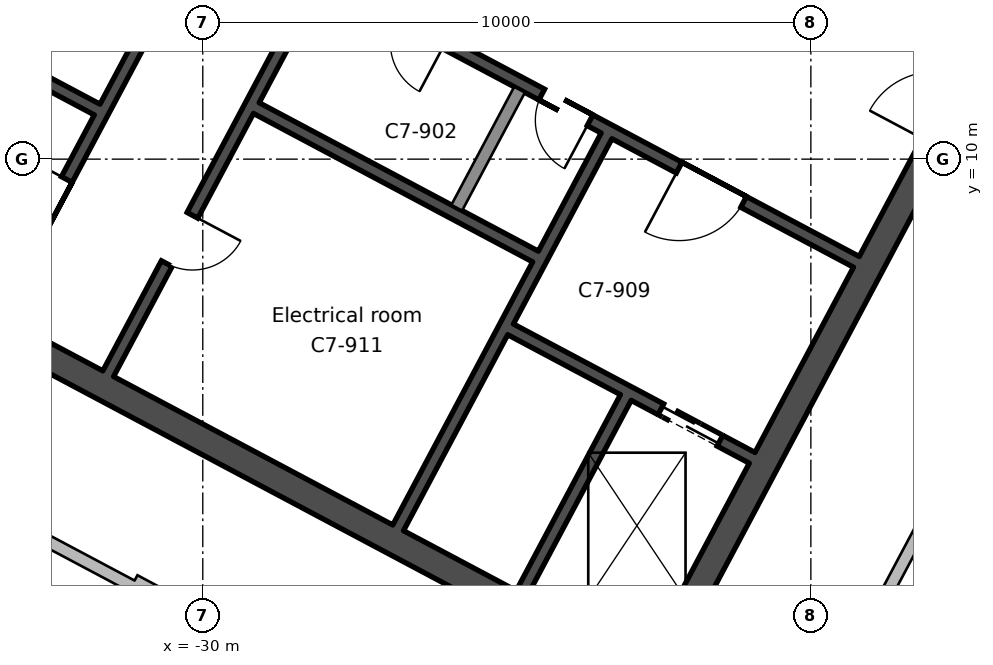
"""IFC4 building model, lengths in metres.
Left out: names, types, materials, properties, quantities, classifications, styles, units other than length and angle.
Written with IfcOpenShell. Run it as: python <this file> out.ifc"""

import sys

from ifc_helpers import new_model, si_unit, direction, frame, frame_2d, origin, place, context, subcontext, project, spatial, rectangle, extrude, element, fill, save


model = new_model("IFC4")
c1 = context("Model", 3, precision=1e-05, world=origin(), true_north=direction((0.0, 1.0)))
c2 = subcontext(c1, "Body", "Model", "MODEL_VIEW")
j1 = project(units=[si_unit("LENGTHUNIT", "METRE"), si_unit("PLANEANGLEUNIT", "RADIAN")], contexts=[c1])
p1 = place(None, origin())
s1 = spatial("IfcSite", under=j1, at=p1, CompositionType="ELEMENT")
p2 = place(p1, origin())
s2 = spatial("IfcBuilding", under=s1, at=p2, CompositionType="ELEMENT")
p3 = place(p2, frame((0.0, 0.0, 353.4)))
s3 = spatial("IfcBuildingStorey", under=s2, at=p3, CompositionType="ELEMENT", Elevation=353.4)
p4 = place(p3, frame((-13.771, 18.138, 0.0), z_axis=(0.0, 0.0, 1.0), x_axis=(-0.469467968382, -0.882949504028, 0.0)))
e1 = element("IfcWall", 1, at=p4, inside=s3, PredefinedType="SHEAR", context=c2, shape_type="SweptSolid", body=[
    extrude(rectangle(XDim=19.1, YDim=0.45, at=frame_2d((9.55, 0.0))), origin(), (0.0, 0.0, 1.0), 4.2),
])
p5 = place(p4, frame((6.55, 0.0, 0.0)))
e2 = element("IfcOpeningElement", 2, at=p5, cuts=e1, PredefinedType="OPENING", context=c2, shape_type="SweptSolid", body=[
    extrude(rectangle(XDim=2.4, YDim=2.4, at=frame_2d((1.2, 1.2))), frame((0.0, 0.235, 0.0), z_axis=(0.0, -1.0, 0.0), x_axis=(1.0, 0.0, 0.0)), (0.0, 0.0, 1.0), 0.47),
])
p6 = place(p3, frame((-32.004, 27.833, 0.0), z_axis=(0.0, 0.0, 1.0), x_axis=(-0.469467968382, -0.882949504028, 0.0)))
e3 = element("IfcWall", 3, at=p6, inside=s3, PredefinedType="SHEAR", context=c2, shape_type="SweptSolid", body=[
    extrude(rectangle(XDim=19.1, YDim=0.45, at=frame_2d((9.55, 0.0))), origin(), (0.0, 0.0, 1.0), 4.2),
])
p7 = place(p6, frame((10.15, 0.0, 0.0)))
e4 = element("IfcOpeningElement", 4, at=p7, cuts=e3, PredefinedType="OPENING", context=c2, shape_type="SweptSolid", body=[
    extrude(rectangle(XDim=2.4, YDim=2.4, at=frame_2d((1.2, 1.2))), frame((0.0, 0.235, 0.0), z_axis=(0.0, -1.0, 0.0), x_axis=(1.0, 0.0, 0.0)), (0.0, 0.0, 1.0), 0.47),
])
p8 = place(p3, frame((-22.832, 1.578, 0.0), z_axis=(0.0, 0.0, 1.0), x_axis=(-0.88294509198, 0.469476266226, 0.0)))
e5 = element("IfcWall", 5, at=p8, inside=s3, PredefinedType="SHEAR", context=c2, shape_type="SweptSolid", body=[
    extrude(rectangle(XDim=20.2, YDim=0.45, at=frame_2d((10.1, 0.0))), origin(), (0.0, 0.0, 1.0), 4.2),
])
p9 = place(p3, frame((-23.043, 6.08, 0.0), z_axis=(0.0, 0.0, 1.0), x_axis=(-0.469494272526, -0.882935517501, 0.0)))
e6 = element("IfcWall", 6, at=p9, inside=s3, PredefinedType="SHEAR", context=c2, shape_type="SweptSolid", body=[
    extrude(rectangle(XDim=3.65, YDim=0.2, at=frame_2d((1.825, 0.0))), origin(), (0.0, 0.0, 1.0), 4.2),
])
p10 = place(p3, frame((-23.36, 10.382, 0.0), z_axis=(0.0, 0.0, 1.0), x_axis=(-0.469480409012, -0.88294288918, 0.0)))
e7 = element("IfcWall", 7, at=p10, inside=s3, PredefinedType="SHEAR", context=c2, shape_type="SweptSolid", body=[
    extrude(rectangle(XDim=7.3, YDim=0.2, at=frame_2d((3.65, 0.0))), origin(), (0.0, 0.0, 1.0), 4.2),
])
p11 = place(p3, frame((-24.791, 11.143, 0.0), z_axis=(0.0, 0.0, 1.0), x_axis=(-0.469487830541, -0.882938942948, 0.0)))
e8 = element("IfcWall", 8, at=p11, inside=s3, PredefinedType="SOLIDWALL", context=c2, shape_type="SweptSolid", body=[
    extrude(rectangle(XDim=2.2, YDim=0.2, at=frame_2d((1.1, 0.0))), origin(), (0.0, 0.0, 1.0), 4.2),
])
p12 = place(p3, frame((-28.128, 12.917, 0.0), z_axis=(0.0, 0.0, 1.0), x_axis=(-0.469454336211, -0.882956752176, 0.0)))
e9 = element("IfcWall", 9, at=p12, inside=s3, PredefinedType="SHEAR", context=c2, shape_type="SweptSolid", body=[
    extrude(rectangle(XDim=7.3, YDim=0.2, at=frame_2d((3.65, 0.0))), origin(), (0.0, 0.0, 1.0), 4.2),
])
p13 = place(p12, frame((4.35, 0.0, 0.0)))
e10 = element("IfcOpeningElement", 10, at=p13, cuts=e9, PredefinedType="OPENING", context=c2, shape_type="SweptSolid", body=[
    extrude(rectangle(XDim=0.9, YDim=2.1, at=frame_2d((0.45, 1.05))), frame((0.0, 0.11, 0.0), z_axis=(0.0, -1.0, 0.0), x_axis=(1.0, 0.0, 0.0)), (0.0, 0.0, 1.0), 0.22),
])
p14 = place(p3, frame((-29.982, 13.903, 0.0), z_axis=(0.0, 0.0, 1.0), x_axis=(-0.469454336211, -0.882956752176, 0.0)))
e11 = element("IfcWall", 11, at=p14, inside=s3, PredefinedType="SHEAR", context=c2, shape_type="SweptSolid", body=[
    extrude(rectangle(XDim=7.3, YDim=0.2, at=frame_2d((3.65, 0.0))), origin(), (0.0, 0.0, 1.0), 4.2),
])
p15 = place(p14, frame((4.8, 0.0, 0.0)))
e12 = element("IfcOpeningElement", 12, at=p15, cuts=e11, PredefinedType="OPENING", context=c2, shape_type="SweptSolid", body=[
    extrude(rectangle(XDim=1.2, YDim=2.1, at=frame_2d((0.6, 1.05))), frame((0.0, 0.11, 0.0), z_axis=(0.0, -1.0, 0.0), x_axis=(1.0, 0.0, 0.0)), (0.0, 0.0, 1.0), 0.22),
])
p16 = place(p3, frame((-19.252, 8.311, 0.0), z_axis=(0.0, 0.0, 1.0), x_axis=(-0.882955722218, 0.469456273365, 0.0)))
e13 = element("IfcWall", 13, at=p16, inside=s3, PredefinedType="SHEAR", context=c2, shape_type="SweptSolid", body=[
    extrude(rectangle(XDim=10.0, YDim=0.2, at=frame_2d((5.0, 0.0))), origin(), (0.0, 0.0, 1.0), 4.2),
])
p17 = place(p16, frame((2.1, 0.0, 0.0)))
e14 = element("IfcOpeningElement", 14, at=p17, cuts=e13, PredefinedType="OPENING", context=c2, shape_type="SweptSolid", body=[
    extrude(rectangle(XDim=1.2, YDim=2.1, at=frame_2d((0.6, 1.05))), frame((0.0, 0.11, 0.0), z_axis=(0.0, -1.0, 0.0), x_axis=(1.0, 0.0, 0.0)), (0.0, 0.0, 1.0), 0.22),
])
p18 = place(p16, frame((4.96, 0.0, 0.0)))
e15 = element("IfcOpeningElement", 15, at=p18, cuts=e13, PredefinedType="OPENING", context=c2, shape_type="SweptSolid", body=[
    extrude(rectangle(XDim=0.9, YDim=2.1, at=frame_2d((0.45, 1.05))), frame((0.0, 0.11, 0.0), z_axis=(0.0, -1.0, 0.0), x_axis=(1.0, 0.0, 0.0)), (0.0, 0.0, 1.0), 0.22),
])
p19 = place(p16, frame((7.66, 0.0, 0.0)))
e16 = element("IfcOpeningElement", 16, at=p19, cuts=e13, PredefinedType="OPENING", context=c2, shape_type="SweptSolid", body=[
    extrude(rectangle(XDim=0.9, YDim=2.1, at=frame_2d((0.45, 1.05))), frame((0.0, 0.11, 0.0), z_axis=(0.0, -1.0, 0.0), x_axis=(1.0, 0.0, 0.0)), (0.0, 0.0, 1.0), 0.22),
])
p20 = place(p3, frame((-24.528, 8.398, 0.0), z_axis=(0.0, 0.0, 1.0), x_axis=(-0.882953967957, 0.469459572775, 0.0)))
e17 = element("IfcWall", 17, at=p20, inside=s3, PredefinedType="SHEAR", context=c2, shape_type="SweptSolid", body=[
    extrude(rectangle(XDim=5.2, YDim=0.2, at=frame_2d((2.6, 0.0))), origin(), (0.0, 0.0, 1.0), 4.2),
])
p21 = place(p3, frame((-20.965, 5.088, 0.0), z_axis=(0.0, 0.0, 1.0), x_axis=(-0.882925986334, 0.469512196493, 0.0)))
e18 = element("IfcWall", 18, at=p21, inside=s3, PredefinedType="SHEAR", context=c2, shape_type="SweptSolid", body=[
    extrude(rectangle(XDim=4.5, YDim=0.2, at=frame_2d((2.25, 0.0))), origin(), (0.0, 0.0, 1.0), 4.2),
])
p22 = place(p21, frame((0.6, 0.0, 0.0)))
e19 = element("IfcOpeningElement", 19, at=p22, cuts=e18, PredefinedType="OPENING", context=c2, shape_type="SweptSolid", body=[
    extrude(rectangle(XDim=1.1, YDim=2.1, at=frame_2d((0.55, 1.05))), frame((0.0, 0.11, 0.0), z_axis=(0.0, -1.0, 0.0), x_axis=(1.0, 0.0, 0.0)), (0.0, 0.0, 1.0), 0.22),
])
p23 = place(p3, frame((-31.737, 10.816, 0.0), z_axis=(0.0, 0.0, 1.0), x_axis=(-0.882940221191, 0.469485426614, 0.0)))
e20 = element("IfcWall", 20, at=p23, inside=s3, PredefinedType="SHEAR", context=c2, shape_type="SweptSolid", body=[
    extrude(rectangle(XDim=8.0, YDim=0.2, at=frame_2d((4.0, 0.0))), origin(), (0.0, 0.0, 1.0), 4.2),
])
p24 = place(p3, frame((-31.151, 2.972, 0.0), z_axis=(0.0, 0.0, 1.0), x_axis=(-0.882950149473, 0.469466754463, 0.0)))
e21 = element("IfcWall", 21, at=p24, inside=s3, PredefinedType="PARTITIONING", context=c2, shape_type="SweptSolid", body=[
    extrude(rectangle(XDim=7.2, YDim=0.2, at=frame_2d((3.6, 0.0))), origin(), (0.0, 0.0, 1.0), 3.8),
])
p25 = place(p24, frame((3.1, 0.0, 0.0)))
e22 = element("IfcOpeningElement", 22, at=p25, cuts=e21, PredefinedType="OPENING", context=c2, shape_type="SweptSolid", body=[
    extrude(rectangle(XDim=1.0, YDim=2.1, at=frame_2d((0.5, 1.05))), frame((0.0, 0.11, 0.0), z_axis=(0.0, -1.0, 0.0), x_axis=(1.0, 0.0, 0.0)), (0.0, 0.0, 1.0), 0.22),
])
p26 = place(p3, frame((-28.044, 1.425, 0.0), z_axis=(0.0, 0.0, 1.0), x_axis=(-0.881938187053, 0.471365075305, 0.0)))
e23 = element("IfcWall", 23, at=p26, inside=s3, PredefinedType="PARTITIONING", context=c2, shape_type="SweptSolid", body=[
    extrude(rectangle(XDim=3.49, YDim=0.2, at=frame_2d((1.745, 0.0))), origin(), (0.0, 0.0, 1.0), 3.8),
])
p27 = place(p3, frame((-10.218, 18.911, 0.0), z_axis=(0.0, 0.0, 1.0), x_axis=(-0.469468702847, -0.882949113509, 0.0)))
e24 = element("IfcWall", 24, at=p27, inside=s3, PredefinedType="PARTITIONING", context=c2, shape_type="SweptSolid", body=[
    extrude(rectangle(XDim=23.8, YDim=0.2, at=frame_2d((11.9, 0.0))), origin(), (0.0, 0.0, 1.0), 3.8),
])
p28 = place(p27, frame((11.4, 0.0, 0.0)))
e25 = element("IfcOpeningElement", 25, at=p28, cuts=e24, PredefinedType="OPENING", context=c2, shape_type="SweptSolid", body=[
    extrude(rectangle(XDim=1.0, YDim=2.1, at=frame_2d((0.5, 1.05))), frame((0.0, 0.11, 0.0), z_axis=(0.0, -1.0, 0.0), x_axis=(1.0, 0.0, 0.0)), (0.0, 0.0, 1.0), 0.22),
])
p29 = place(p17, origin())
e26 = element("IfcDoor", 26, at=p29, inside=s3, OperationType="SINGLE_SWING_RIGHT", PredefinedType="DOOR", context=c2, shape_type="SweptSolid", body=[
    extrude(rectangle(XDim=1.2, YDim=2.1, at=frame_2d((0.6, 1.05))), frame((0.0, 0.025, 0.0), z_axis=(0.0, -1.0, 0.0), x_axis=(1.0, 0.0, 0.0)), (0.0, 0.0, 1.0), 0.05),
])
fill(e14, e26)
p30 = place(p15, frame((1.2, 0.0, 0.0), z_axis=(0.0, 0.0, 1.0), x_axis=(-1.0, 0.0, 0.0)))
e27 = element("IfcDoor", 27, at=p30, inside=s3, OperationType="SINGLE_SWING_RIGHT", PredefinedType="DOOR", context=c2, shape_type="SweptSolid", body=[
    extrude(rectangle(XDim=1.2, YDim=2.1, at=frame_2d((0.6, 1.05))), frame((0.0, 0.025, 0.0), z_axis=(0.0, -1.0, 0.0), x_axis=(1.0, 0.0, 0.0)), (0.0, 0.0, 1.0), 0.05),
])
fill(e12, e27)
p31 = place(p18, origin())
e28 = element("IfcDoor", 28, at=p31, inside=s3, OperationType="SINGLE_SWING_LEFT", PredefinedType="DOOR", context=c2, shape_type="SweptSolid", body=[
    extrude(rectangle(XDim=0.9, YDim=2.1, at=frame_2d((0.45, 1.05))), frame((0.0, 0.025, 0.0), z_axis=(0.0, -1.0, 0.0), x_axis=(1.0, 0.0, 0.0)), (0.0, 0.0, 1.0), 0.05),
])
fill(e15, e28)
p32 = place(p22, origin())
e29 = element("IfcDoor", 29, at=p32, inside=s3, OperationType="DOUBLE_DOOR_SLIDING", PredefinedType="DOOR", context=c2, shape_type="SweptSolid", body=[
    extrude(rectangle(XDim=1.1, YDim=2.1, at=frame_2d((0.55, 1.05))), frame((0.0, 0.025, 0.0), z_axis=(0.0, -1.0, 0.0), x_axis=(1.0, 0.0, 0.0)), (0.0, 0.0, 1.0), 0.05),
])
fill(e19, e29)
p33 = place(p13, origin())
e30 = element("IfcDoor", 30, at=p33, inside=s3, OperationType="SINGLE_SWING_LEFT", PredefinedType="DOOR", context=c2, shape_type="SweptSolid", body=[
    extrude(rectangle(XDim=0.9, YDim=2.1, at=frame_2d((0.45, 1.05))), frame((0.0, 0.025, 0.0), z_axis=(0.0, -1.0, 0.0), x_axis=(1.0, 0.0, 0.0)), (0.0, 0.0, 1.0), 0.05),
])
fill(e10, e30)
save(model, sys.argv[1])
